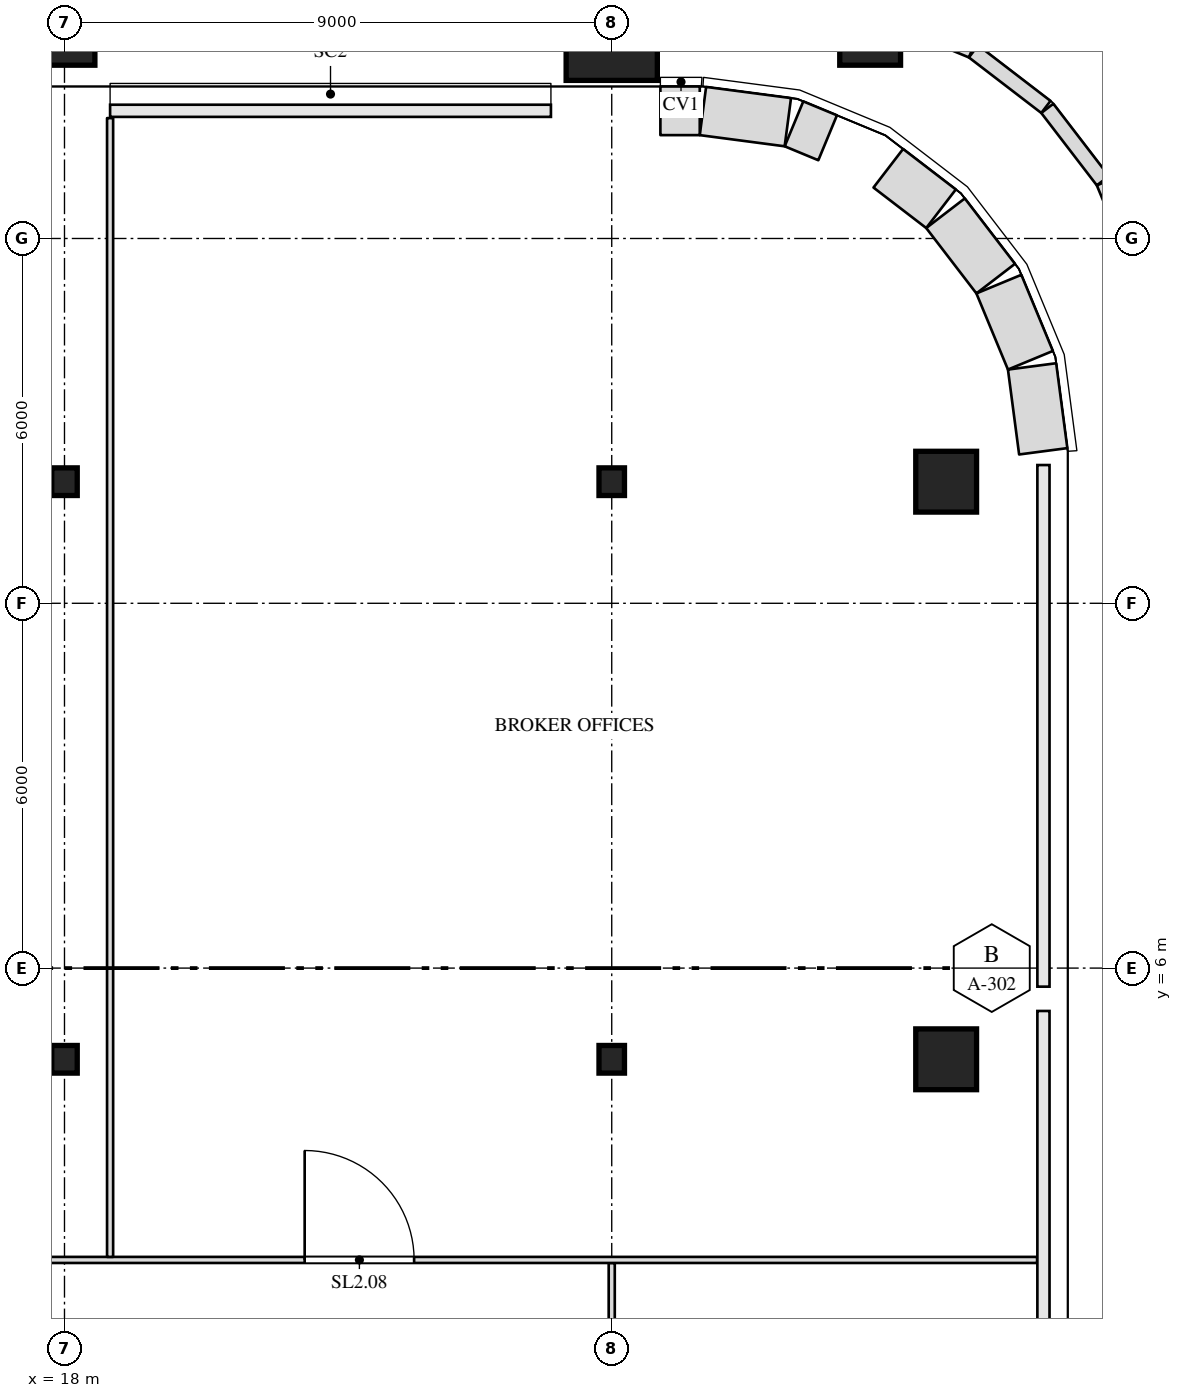
"""IFC4 building model, lengths in metres.
Left out: names, types, materials, properties, quantities, classifications, styles, units other than length and angle.
Written with IfcOpenShell. Run it as: python <this file> out.ifc"""

import sys

from ifc_helpers import new_model, si_unit, direction, frame, frame_2d, origin, origin_2d, place, context, subcontext, project, spatial, rectangle, i_section, extrude, clip, halfspace, element, fill, save


model = new_model("IFC4")
c1 = context("Model", 3, precision=1e-05, world=origin(), true_north=direction((0.0, 1.0)))
c2 = subcontext(c1, "Body", "Model", "MODEL_VIEW")
j1 = project(units=[si_unit("LENGTHUNIT", "METRE"), si_unit("PLANEANGLEUNIT", "RADIAN")], contexts=[c1])
p1 = place(None, origin())
s1 = spatial("IfcSite", under=j1, at=p1, CompositionType="ELEMENT")
p2 = place(p1, origin())
s2 = spatial("IfcBuilding", under=s1, at=p2, CompositionType="ELEMENT")
p3 = place(p2, frame((0.0, 0.0, 156.5)))
s3 = spatial("IfcBuildingStorey", under=s2, at=p3, CompositionType="ELEMENT", Elevation=156.5)
for number, where, z_axis, x_axis in (
    (1, (18.0, 4.5, 0.0), (0.0, 0.0, 1.0), (1.0, 0.0, 0.0)),
    (2, (27.0, 4.5, 0.0), (0.0, 0.0, 1.0), (1.0, 0.0, 0.0)),
):
    element("IfcColumn", number, at=place(p3, frame(where, z_axis=z_axis, x_axis=x_axis)), inside=s3, PredefinedType="COLUMN", context=c2, shape_type="SweptSolid", body=[
        extrude(i_section(OverallWidth=0.419, OverallDepth=0.455, WebThickness=0.042, FlangeThickness=0.068, at=origin_2d()), origin(), (0.0, 0.0, 1.0), 4.0),
    ])
p4 = place(p3, frame((32.5, 4.5, 0.0), z_axis=(0.0, 0.0, 1.0), x_axis=(1.0, 0.0, 0.0)))
e3 = element("IfcColumn", 3, at=p4, inside=s3, PredefinedType="COLUMN", context=c2, shape_type="SweptSolid", body=[
    extrude(rectangle(XDim=1.0, YDim=1.0, at=origin_2d()), origin(), (0.0, 0.0, 1.0), 4.0),
])
for number, where, z_axis, x_axis in (
    (4, (18.0, 14.0, 0.0), (0.0, 0.0, 1.0), (1.0, 0.0, 0.0)),
    (5, (27.0, 14.0, 0.0), (0.0, 0.0, 1.0), (1.0, 0.0, 0.0)),
):
    element("IfcColumn", number, at=place(p3, frame(where, z_axis=z_axis, x_axis=x_axis)), inside=s3, PredefinedType="COLUMN", context=c2, shape_type="SweptSolid", body=[
        extrude(i_section(OverallWidth=0.419, OverallDepth=0.455, WebThickness=0.042, FlangeThickness=0.068, at=origin_2d()), origin(), (0.0, 0.0, 1.0), 4.0),
    ])
p5 = place(p3, frame((32.5, 14.0, 0.0), z_axis=(0.0, 0.0, 1.0), x_axis=(1.0, 0.0, 0.0)))
e6 = element("IfcColumn", 6, at=p5, inside=s3, PredefinedType="COLUMN", context=c2, shape_type="SweptSolid", body=[
    extrude(rectangle(XDim=1.0, YDim=1.0, at=origin_2d()), origin(), (0.0, 0.0, 1.0), 4.0),
])
p6 = place(p3, frame((18.0, 20.0, 0.0), z_axis=(0.0, 0.747409318684, 0.66436383883), x_axis=(-1.0, 0.0, 0.0)))
e7 = element("IfcColumn", 7, at=p6, inside=s3, PredefinedType="COLUMN", context=c2, shape_type="Clipping", body=[
    clip(extrude(rectangle(XDim=1.0, YDim=1.0, at=origin_2d()), origin(), (0.0, 0.0, 1.0), 6.021), halfspace(frame((0.0, 0.0, 0.562)), True)),
])
p7 = place(p3, frame((27.0, 20.0, 0.0), z_axis=(0.0, 0.747409318684, 0.66436383883), x_axis=(-1.0, 0.0, 0.0)))
e8 = element("IfcColumn", 8, at=p7, inside=s3, PredefinedType="COLUMN", context=c2, shape_type="Clipping", body=[
    clip(extrude(rectangle(XDim=1.5, YDim=1.5, at=origin_2d()), origin(), (0.0, 0.0, 1.0), 6.021), halfspace(frame((0.0, 0.0, 0.844)), True)),
])
p8 = place(p3, frame((31.25, 20.0, 0.0), z_axis=(0.0, 0.747409318684, 0.66436383883), x_axis=(-1.0, 0.0, 0.0)))
e9 = element("IfcColumn", 9, at=p8, inside=s3, PredefinedType="COLUMN", context=c2, shape_type="Clipping", body=[
    clip(extrude(rectangle(XDim=1.0, YDim=1.0, at=origin_2d()), origin(), (0.0, 0.0, 1.0), 6.021), halfspace(frame((0.0, 0.0, 0.562)), True)),
])
p9 = place(p3, frame((27.0, -2.0, 0.0), z_axis=(0.0, 0.0, 1.0), x_axis=(0.0, 1.0, 0.0)))
e10 = element("IfcWall", 10, at=p9, inside=s3, PredefinedType="PARTITIONING", context=c2, shape_type="SweptSolid", body=[
    extrude(rectangle(XDim=3.15, YDim=0.1, at=frame_2d((1.575, 0.0))), origin(), (0.0, 0.0, 1.0), 3.038),
])
p10 = place(p9, frame((1.1, 0.0, 0.0)))
e11 = element("IfcOpeningElement", 11, at=p10, cuts=e10, PredefinedType="OPENING", context=c2, shape_type="SweptSolid", body=[
    extrude(rectangle(XDim=1.0, YDim=2.1, at=frame_2d((0.5, 1.05))), frame((0.0, 0.062, 0.0), z_axis=(0.0, -1.0, 0.0), x_axis=(1.0, 0.0, 0.0)), (0.0, 0.0, 1.0), 0.124),
])
p11 = place(p3, frame((-33.98, 1.2, 0.0), z_axis=(0.0, 0.0, 1.0), x_axis=(1.0, 0.0, 0.0)))
e12 = element("IfcWall", 12, at=p11, inside=s3, PredefinedType="PARTITIONING", context=c2, shape_type="SweptSolid", body=[
    extrude(rectangle(XDim=67.976, YDim=0.1, at=frame_2d((33.988, 0.0))), origin(), (0.0, 0.0, 1.0), 3.65),
])
p12 = place(p11, frame((8.38, 0.0, 0.0)))
e13 = element("IfcOpeningElement", 13, at=p12, cuts=e12, PredefinedType="OPENING", context=c2, shape_type="SweptSolid", body=[
    extrude(rectangle(XDim=1.8, YDim=2.1, at=frame_2d((0.9, 1.05))), frame((0.0, 0.062, 0.0), z_axis=(0.0, -1.0, 0.0), x_axis=(1.0, 0.0, 0.0)), (0.0, 0.0, 1.0), 0.124),
])
p13 = place(p11, frame((15.5, 0.0, 0.0)))
e14 = element("IfcOpeningElement", 14, at=p13, cuts=e12, PredefinedType="OPENING", context=c2, shape_type="SweptSolid", body=[
    extrude(rectangle(XDim=1.0, YDim=2.1, at=frame_2d((0.5, 1.05))), frame((0.0, 0.062, 0.0), z_axis=(0.0, -1.0, 0.0), x_axis=(1.0, 0.0, 0.0)), (0.0, 0.0, 1.0), 0.124),
])
p14 = place(p11, frame((24.01, 0.0, 0.0)))
e15 = element("IfcOpeningElement", 15, at=p14, cuts=e12, PredefinedType="OPENING", context=c2, shape_type="SweptSolid", body=[
    extrude(rectangle(XDim=1.8, YDim=2.1, at=frame_2d((0.9, 1.05))), frame((0.0, 0.062, 0.0), z_axis=(0.0, -1.0, 0.0), x_axis=(1.0, 0.0, 0.0)), (0.0, 0.0, 1.0), 0.124),
])
p15 = place(p11, frame((31.23, 0.0, 0.0)))
e16 = element("IfcOpeningElement", 16, at=p15, cuts=e12, PredefinedType="OPENING", context=c2, shape_type="SweptSolid", body=[
    extrude(rectangle(XDim=1.8, YDim=2.1, at=frame_2d((0.9, 1.05))), frame((0.0, 0.062, 0.0), z_axis=(0.0, -1.0, 0.0), x_axis=(1.0, 0.0, 0.0)), (0.0, 0.0, 1.0), 0.124),
])
p16 = place(p11, frame((44.66, 0.0, 0.0)))
e17 = element("IfcOpeningElement", 17, at=p16, cuts=e12, PredefinedType="OPENING", context=c2, shape_type="SweptSolid", body=[
    extrude(rectangle(XDim=1.8, YDim=2.1, at=frame_2d((0.9, 1.05))), frame((0.0, 0.062, 0.0), z_axis=(0.0, -1.0, 0.0), x_axis=(1.0, 0.0, 0.0)), (0.0, 0.0, 1.0), 0.124),
])
p17 = place(p11, frame((55.93, 0.0, 0.0)))
e18 = element("IfcOpeningElement", 18, at=p17, cuts=e12, PredefinedType="OPENING", context=c2, shape_type="SweptSolid", body=[
    extrude(rectangle(XDim=1.8, YDim=2.1, at=frame_2d((0.9, 1.05))), frame((0.0, 0.062, 0.0), z_axis=(0.0, -1.0, 0.0), x_axis=(1.0, 0.0, 0.0)), (0.0, 0.0, 1.0), 0.124),
])
p18 = place(p3, frame((18.75, 1.25, 0.0), z_axis=(0.0, 0.0, 1.0), x_axis=(0.0, 1.0, 0.0)))
e19 = element("IfcWall", 19, at=p18, inside=s3, PredefinedType="PARTITIONING", context=c2, shape_type="SweptSolid", body=[
    extrude(rectangle(XDim=18.73, YDim=0.1, at=frame_2d((9.365, 0.0))), origin(), (0.0, 0.0, 1.0), 3.65),
])
p19 = place(p3, frame((34.097, 14.5, 0.0), z_axis=(0.0, 0.0, 1.0), x_axis=(-0.130517283865, 0.99144603414, 0.0)))
e20 = element("IfcWall", 20, at=p19, inside=s3, PredefinedType="SOLIDWALL", context=c2, shape_type="SweptSolid", body=[
    extrude(rectangle(XDim=1.408, YDim=0.8, at=frame_2d((0.704, 0.0))), origin(), (0.0, 0.0, 1.0), 3.65),
])
p20 = place(p3, frame((33.886, 15.997, 0.0), z_axis=(0.0, 0.0, 1.0), x_axis=(-0.38276009378, 0.923847774587, 0.0)))
e21 = element("IfcWall", 21, at=p20, inside=s3, PredefinedType="SOLIDWALL", context=c2, shape_type="SweptSolid", body=[
    extrude(rectangle(XDim=1.355, YDim=0.8, at=frame_2d((0.678, 0.0))), origin(), (0.0, 0.0, 1.0), 3.65),
])
p21 = place(p3, frame((33.315, 17.34, 0.0), z_axis=(0.0, 0.0, 1.0), x_axis=(-0.608866226366, 0.793272915452, 0.0)))
e22 = element("IfcWall", 22, at=p21, inside=s3, PredefinedType="SOLIDWALL", context=c2, shape_type="SweptSolid", body=[
    extrude(rectangle(XDim=1.356, YDim=0.8, at=frame_2d((0.678, 0.0))), origin(), (0.0, 0.0, 1.0), 3.65),
])
p22 = place(p3, frame((32.416, 18.489, 0.0), z_axis=(0.0, 0.0, 1.0), x_axis=(-0.793279231512, 0.60885799728, 0.0)))
e23 = element("IfcWall", 23, at=p22, inside=s3, PredefinedType="SOLIDWALL", context=c2, shape_type="SweptSolid", body=[
    extrude(rectangle(XDim=1.094, YDim=0.8, at=frame_2d((0.547, 0.0))), origin(), (0.0, 0.0, 1.0), 3.65),
])
p23 = place(p3, frame((30.551, 19.656, 0.0), z_axis=(0.0, 0.0, 1.0), x_axis=(-0.923882723383, 0.382675728829, 0.0)))
e24 = element("IfcWall", 24, at=p23, inside=s3, PredefinedType="SOLIDWALL", context=c2, shape_type="SweptSolid", body=[
    extrude(rectangle(XDim=0.599, YDim=0.8, at=frame_2d((0.3, 0.0))), origin(), (0.0, 0.0, 1.0), 3.65),
])
p24 = place(p3, frame((29.896, 19.913, 0.0), z_axis=(0.0, 0.0, 1.0), x_axis=(-0.99144603414, 0.130517283865, 0.0)))
e25 = element("IfcWall", 25, at=p24, inside=s3, PredefinedType="SOLIDWALL", context=c2, shape_type="SweptSolid", body=[
    extrude(rectangle(XDim=1.408, YDim=0.8, at=frame_2d((0.704, 0.0))), origin(), (0.0, 0.0, 1.0), 3.65),
])
p25 = place(p3, frame((28.448, 20.1, 0.0), z_axis=(0.0, 0.0, 1.0), x_axis=(-1.0, 0.0, 0.0)))
e26 = element("IfcWall", 26, at=p25, inside=s3, PredefinedType="SOLIDWALL", context=c2, shape_type="SweptSolid", body=[
    extrude(rectangle(XDim=0.647, YDim=0.8, at=frame_2d((0.324, 0.0))), origin(), (0.0, 0.0, 1.0), 3.65),
])
for number, where, z_axis, x_axis in (
    (27, (35.667, 17.535, 0.0), (0.0, 0.0, 1.0), (-0.383, 0.924, 0.0)),
    (28, (35.077, 18.95, 0.0), (0.0, 0.0, 1.0), (-0.609, 0.793, 0.0)),
    (29, (34.14, 20.164, 0.0), (0.0, 0.0, 1.0), (-0.793, 0.609, 0.0)),
    (30, (32.922, 21.093, 0.0), (0.0, 0.0, 1.0), (-0.924, 0.383, 0.0)),
):
    element("IfcWall", number, at=place(p3, frame(where, z_axis=z_axis, x_axis=x_axis)), inside=s3, PredefinedType="PARAPET", context=c2, shape_type="SweptSolid", body=[
        extrude(rectangle(XDim=1.5, YDim=0.25, at=frame_2d((0.75, 0.0))), origin(), (0.0, 0.0, 1.0), 1.1),
    ])
p26 = place(p17, origin())
e31 = element("IfcDoor", 31, at=p26, inside=s3, OperationType="DOUBLE_DOOR_SINGLE_SWING", PredefinedType="DOOR", context=c2, shape_type="SweptSolid", body=[
    extrude(rectangle(XDim=1.8, YDim=2.1, at=frame_2d((0.9, 1.05))), frame((0.0, 0.025, 0.0), z_axis=(0.0, -1.0, 0.0), x_axis=(1.0, 0.0, 0.0)), (0.0, 0.0, 1.0), 0.05),
])
fill(e18, e31)
save(model, sys.argv[1])
